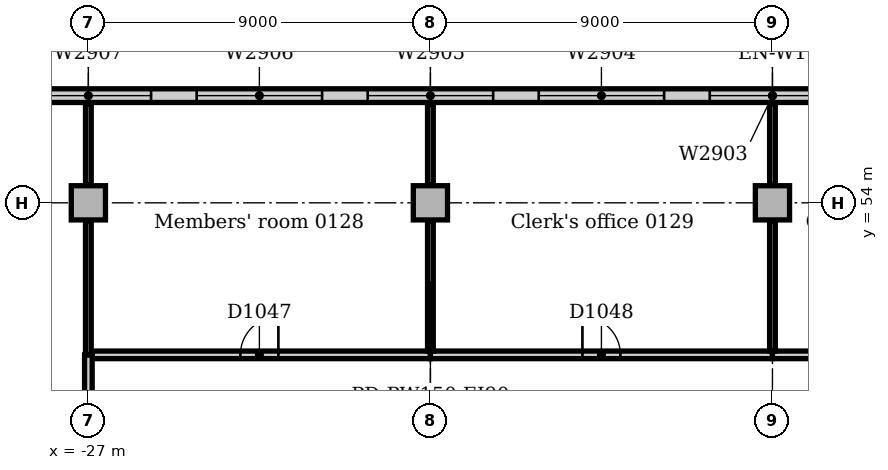
"""IFC4 building model, lengths in metres.
Left out: names, types, materials, properties, quantities, classifications, styles, units other than length and angle.
Written with IfcOpenShell. Run it as: python <this file> out.ifc"""

import sys

from ifc_helpers import new_model, si_unit, direction, frame, frame_2d, origin, origin_2d, place, context, subcontext, project, spatial, rectangle, extrude, element, fill, save


model = new_model("IFC4")
c1 = context("Model", 3, precision=1e-05, world=origin(), true_north=direction((0.0, 1.0)))
c2 = subcontext(c1, "Body", "Model", "MODEL_VIEW")
j1 = project(units=[si_unit("LENGTHUNIT", "METRE"), si_unit("PLANEANGLEUNIT", "RADIAN")], contexts=[c1])
p1 = place(None, origin())
s1 = spatial("IfcSite", under=j1, at=p1, CompositionType="ELEMENT")
p2 = place(p1, origin())
s2 = spatial("IfcBuilding", under=s1, at=p2, CompositionType="ELEMENT")
p3 = place(p2, frame((0.0, 0.0, 6.0)))
s3 = spatial("IfcBuildingStorey", under=s2, at=p3, CompositionType="ELEMENT", Elevation=6.0)
for number, where, z_axis, x_axis in (
    (1, (-27.0, 54.0, 0.0), (0.0, 0.0, 1.0), (1.0, 0.0, 0.0)),
    (2, (-18.0, 54.0, 0.0), (0.0, 0.0, 1.0), (1.0, 0.0, 0.0)),
    (3, (-9.0, 54.0, 0.0), (0.0, 0.0, 1.0), (1.0, 0.0, 0.0)),
):
    element("IfcColumn", number, at=place(p3, frame(where, z_axis=z_axis, x_axis=x_axis)), inside=s3, PredefinedType="COLUMN", context=c2, shape_type="SweptSolid", body=[
        extrude(rectangle(XDim=0.9, YDim=0.9, at=origin_2d()), origin(), (0.0, 0.0, 1.0), 4.7),
    ])
p4 = place(p3, frame((63.0, 56.82, 0.0), z_axis=(0.0, 0.0, 1.0), x_axis=(-1.0, 0.0, 0.0)))
e4 = element("IfcWall", 4, at=p4, inside=s3, PredefinedType="STANDARD", context=c2, shape_type="SweptSolid", body=[
    extrude(rectangle(XDim=144.0, YDim=0.36, at=frame_2d((72.0, 0.0))), origin(), (0.0, 0.0, 1.0), 4.7),
])
p5 = place(p4, frame((2.85, 0.0, 0.9)))
e5 = element("IfcOpeningElement", 5, at=p5, cuts=e4, PredefinedType="OPENING", context=c2, shape_type="SweptSolid", body=[
    extrude(rectangle(XDim=3.3, YDim=2.4, at=frame_2d((1.65, 1.2))), frame((0.0, 0.19, 0.0), z_axis=(0.0, -1.0, 0.0), x_axis=(1.0, 0.0, 0.0)), (0.0, 0.0, 1.0), 0.38),
])
p6 = place(p4, frame((7.35, 0.0, 0.9)))
e6 = element("IfcOpeningElement", 6, at=p6, cuts=e4, PredefinedType="OPENING", context=c2, shape_type="SweptSolid", body=[
    extrude(rectangle(XDim=3.3, YDim=2.4, at=frame_2d((1.65, 1.2))), frame((0.0, 0.19, 0.0), z_axis=(0.0, -1.0, 0.0), x_axis=(1.0, 0.0, 0.0)), (0.0, 0.0, 1.0), 0.38),
])
p7 = place(p4, frame((11.85, 0.0, 0.9)))
e7 = element("IfcOpeningElement", 7, at=p7, cuts=e4, PredefinedType="OPENING", context=c2, shape_type="SweptSolid", body=[
    extrude(rectangle(XDim=3.3, YDim=2.4, at=frame_2d((1.65, 1.2))), frame((0.0, 0.19, 0.0), z_axis=(0.0, -1.0, 0.0), x_axis=(1.0, 0.0, 0.0)), (0.0, 0.0, 1.0), 0.38),
])
p8 = place(p4, frame((16.35, 0.0, 0.9)))
e8 = element("IfcOpeningElement", 8, at=p8, cuts=e4, PredefinedType="OPENING", context=c2, shape_type="SweptSolid", body=[
    extrude(rectangle(XDim=3.3, YDim=2.4, at=frame_2d((1.65, 1.2))), frame((0.0, 0.19, 0.0), z_axis=(0.0, -1.0, 0.0), x_axis=(1.0, 0.0, 0.0)), (0.0, 0.0, 1.0), 0.38),
])
p9 = place(p4, frame((20.85, 0.0, 0.9)))
e9 = element("IfcOpeningElement", 9, at=p9, cuts=e4, PredefinedType="OPENING", context=c2, shape_type="SweptSolid", body=[
    extrude(rectangle(XDim=3.3, YDim=2.4, at=frame_2d((1.65, 1.2))), frame((0.0, 0.19, 0.0), z_axis=(0.0, -1.0, 0.0), x_axis=(1.0, 0.0, 0.0)), (0.0, 0.0, 1.0), 0.38),
])
p10 = place(p4, frame((25.35, 0.0, 0.9)))
e10 = element("IfcOpeningElement", 10, at=p10, cuts=e4, PredefinedType="OPENING", context=c2, shape_type="SweptSolid", body=[
    extrude(rectangle(XDim=3.3, YDim=2.4, at=frame_2d((1.65, 1.2))), frame((0.0, 0.19, 0.0), z_axis=(0.0, -1.0, 0.0), x_axis=(1.0, 0.0, 0.0)), (0.0, 0.0, 1.0), 0.38),
])
p11 = place(p4, frame((29.85, 0.0, 0.9)))
e11 = element("IfcOpeningElement", 11, at=p11, cuts=e4, PredefinedType="OPENING", context=c2, shape_type="SweptSolid", body=[
    extrude(rectangle(XDim=3.3, YDim=2.4, at=frame_2d((1.65, 1.2))), frame((0.0, 0.19, 0.0), z_axis=(0.0, -1.0, 0.0), x_axis=(1.0, 0.0, 0.0)), (0.0, 0.0, 1.0), 0.38),
])
p12 = place(p4, frame((34.35, 0.0, 0.9)))
e12 = element("IfcOpeningElement", 12, at=p12, cuts=e4, PredefinedType="OPENING", context=c2, shape_type="SweptSolid", body=[
    extrude(rectangle(XDim=3.3, YDim=2.4, at=frame_2d((1.65, 1.2))), frame((0.0, 0.19, 0.0), z_axis=(0.0, -1.0, 0.0), x_axis=(1.0, 0.0, 0.0)), (0.0, 0.0, 1.0), 0.38),
])
p13 = place(p4, frame((38.85, 0.0, 0.9)))
e13 = element("IfcOpeningElement", 13, at=p13, cuts=e4, PredefinedType="OPENING", context=c2, shape_type="SweptSolid", body=[
    extrude(rectangle(XDim=3.3, YDim=2.4, at=frame_2d((1.65, 1.2))), frame((0.0, 0.19, 0.0), z_axis=(0.0, -1.0, 0.0), x_axis=(1.0, 0.0, 0.0)), (0.0, 0.0, 1.0), 0.38),
])
p14 = place(p4, frame((43.35, 0.0, 0.9)))
e14 = element("IfcOpeningElement", 14, at=p14, cuts=e4, PredefinedType="OPENING", context=c2, shape_type="SweptSolid", body=[
    extrude(rectangle(XDim=3.3, YDim=2.4, at=frame_2d((1.65, 1.2))), frame((0.0, 0.19, 0.0), z_axis=(0.0, -1.0, 0.0), x_axis=(1.0, 0.0, 0.0)), (0.0, 0.0, 1.0), 0.38),
])
p15 = place(p4, frame((47.85, 0.0, 0.9)))
e15 = element("IfcOpeningElement", 15, at=p15, cuts=e4, PredefinedType="OPENING", context=c2, shape_type="SweptSolid", body=[
    extrude(rectangle(XDim=3.3, YDim=2.4, at=frame_2d((1.65, 1.2))), frame((0.0, 0.19, 0.0), z_axis=(0.0, -1.0, 0.0), x_axis=(1.0, 0.0, 0.0)), (0.0, 0.0, 1.0), 0.38),
])
p16 = place(p4, frame((52.35, 0.0, 0.9)))
e16 = element("IfcOpeningElement", 16, at=p16, cuts=e4, PredefinedType="OPENING", context=c2, shape_type="SweptSolid", body=[
    extrude(rectangle(XDim=3.3, YDim=2.4, at=frame_2d((1.65, 1.2))), frame((0.0, 0.19, 0.0), z_axis=(0.0, -1.0, 0.0), x_axis=(1.0, 0.0, 0.0)), (0.0, 0.0, 1.0), 0.38),
])
p17 = place(p4, frame((56.85, 0.0, 0.9)))
e17 = element("IfcOpeningElement", 17, at=p17, cuts=e4, PredefinedType="OPENING", context=c2, shape_type="SweptSolid", body=[
    extrude(rectangle(XDim=3.3, YDim=2.4, at=frame_2d((1.65, 1.2))), frame((0.0, 0.19, 0.0), z_axis=(0.0, -1.0, 0.0), x_axis=(1.0, 0.0, 0.0)), (0.0, 0.0, 1.0), 0.38),
])
p18 = place(p4, frame((61.35, 0.0, 0.9)))
e18 = element("IfcOpeningElement", 18, at=p18, cuts=e4, PredefinedType="OPENING", context=c2, shape_type="SweptSolid", body=[
    extrude(rectangle(XDim=3.3, YDim=2.4, at=frame_2d((1.65, 1.2))), frame((0.0, 0.19, 0.0), z_axis=(0.0, -1.0, 0.0), x_axis=(1.0, 0.0, 0.0)), (0.0, 0.0, 1.0), 0.38),
])
p19 = place(p4, frame((65.85, 0.0, 0.9)))
e19 = element("IfcOpeningElement", 19, at=p19, cuts=e4, PredefinedType="OPENING", context=c2, shape_type="SweptSolid", body=[
    extrude(rectangle(XDim=3.3, YDim=2.4, at=frame_2d((1.65, 1.2))), frame((0.0, 0.19, 0.0), z_axis=(0.0, -1.0, 0.0), x_axis=(1.0, 0.0, 0.0)), (0.0, 0.0, 1.0), 0.38),
])
p20 = place(p4, frame((70.35, 0.0, 0.9)))
e20 = element("IfcOpeningElement", 20, at=p20, cuts=e4, PredefinedType="OPENING", context=c2, shape_type="SweptSolid", body=[
    extrude(rectangle(XDim=3.3, YDim=2.4, at=frame_2d((1.65, 1.2))), frame((0.0, 0.19, 0.0), z_axis=(0.0, -1.0, 0.0), x_axis=(1.0, 0.0, 0.0)), (0.0, 0.0, 1.0), 0.38),
])
p21 = place(p4, frame((74.85, 0.0, 0.9)))
e21 = element("IfcOpeningElement", 21, at=p21, cuts=e4, PredefinedType="OPENING", context=c2, shape_type="SweptSolid", body=[
    extrude(rectangle(XDim=3.3, YDim=2.4, at=frame_2d((1.65, 1.2))), frame((0.0, 0.19, 0.0), z_axis=(0.0, -1.0, 0.0), x_axis=(1.0, 0.0, 0.0)), (0.0, 0.0, 1.0), 0.38),
])
p22 = place(p4, frame((79.35, 0.0, 0.9)))
e22 = element("IfcOpeningElement", 22, at=p22, cuts=e4, PredefinedType="OPENING", context=c2, shape_type="SweptSolid", body=[
    extrude(rectangle(XDim=3.3, YDim=2.4, at=frame_2d((1.65, 1.2))), frame((0.0, 0.19, 0.0), z_axis=(0.0, -1.0, 0.0), x_axis=(1.0, 0.0, 0.0)), (0.0, 0.0, 1.0), 0.38),
])
p23 = place(p4, frame((83.85, 0.0, 0.9)))
e23 = element("IfcOpeningElement", 23, at=p23, cuts=e4, PredefinedType="OPENING", context=c2, shape_type="SweptSolid", body=[
    extrude(rectangle(XDim=3.3, YDim=2.4, at=frame_2d((1.65, 1.2))), frame((0.0, 0.19, 0.0), z_axis=(0.0, -1.0, 0.0), x_axis=(1.0, 0.0, 0.0)), (0.0, 0.0, 1.0), 0.38),
])
p24 = place(p4, frame((88.35, 0.0, 0.9)))
e24 = element("IfcOpeningElement", 24, at=p24, cuts=e4, PredefinedType="OPENING", context=c2, shape_type="SweptSolid", body=[
    extrude(rectangle(XDim=3.3, YDim=2.4, at=frame_2d((1.65, 1.2))), frame((0.0, 0.19, 0.0), z_axis=(0.0, -1.0, 0.0), x_axis=(1.0, 0.0, 0.0)), (0.0, 0.0, 1.0), 0.38),
])
p25 = place(p4, frame((92.85, 0.0, 0.9)))
e25 = element("IfcOpeningElement", 25, at=p25, cuts=e4, PredefinedType="OPENING", context=c2, shape_type="SweptSolid", body=[
    extrude(rectangle(XDim=3.3, YDim=2.4, at=frame_2d((1.65, 1.2))), frame((0.0, 0.19, 0.0), z_axis=(0.0, -1.0, 0.0), x_axis=(1.0, 0.0, 0.0)), (0.0, 0.0, 1.0), 0.38),
])
p26 = place(p4, frame((97.35, 0.0, 0.9)))
e26 = element("IfcOpeningElement", 26, at=p26, cuts=e4, PredefinedType="OPENING", context=c2, shape_type="SweptSolid", body=[
    extrude(rectangle(XDim=3.3, YDim=2.4, at=frame_2d((1.65, 1.2))), frame((0.0, 0.19, 0.0), z_axis=(0.0, -1.0, 0.0), x_axis=(1.0, 0.0, 0.0)), (0.0, 0.0, 1.0), 0.38),
])
p27 = place(p4, frame((101.85, 0.0, 0.9)))
e27 = element("IfcOpeningElement", 27, at=p27, cuts=e4, PredefinedType="OPENING", context=c2, shape_type="SweptSolid", body=[
    extrude(rectangle(XDim=3.3, YDim=2.4, at=frame_2d((1.65, 1.2))), frame((0.0, 0.19, 0.0), z_axis=(0.0, -1.0, 0.0), x_axis=(1.0, 0.0, 0.0)), (0.0, 0.0, 1.0), 0.38),
])
p28 = place(p4, frame((106.35, 0.0, 0.9)))
e28 = element("IfcOpeningElement", 28, at=p28, cuts=e4, PredefinedType="OPENING", context=c2, shape_type="SweptSolid", body=[
    extrude(rectangle(XDim=3.3, YDim=2.4, at=frame_2d((1.65, 1.2))), frame((0.0, 0.19, 0.0), z_axis=(0.0, -1.0, 0.0), x_axis=(1.0, 0.0, 0.0)), (0.0, 0.0, 1.0), 0.38),
])
p29 = place(p4, frame((110.85, 0.0, 0.9)))
e29 = element("IfcOpeningElement", 29, at=p29, cuts=e4, PredefinedType="OPENING", context=c2, shape_type="SweptSolid", body=[
    extrude(rectangle(XDim=3.3, YDim=2.4, at=frame_2d((1.65, 1.2))), frame((0.0, 0.19, 0.0), z_axis=(0.0, -1.0, 0.0), x_axis=(1.0, 0.0, 0.0)), (0.0, 0.0, 1.0), 0.38),
])
p30 = place(p4, frame((115.35, 0.0, 0.9)))
e30 = element("IfcOpeningElement", 30, at=p30, cuts=e4, PredefinedType="OPENING", context=c2, shape_type="SweptSolid", body=[
    extrude(rectangle(XDim=3.3, YDim=2.4, at=frame_2d((1.65, 1.2))), frame((0.0, 0.19, 0.0), z_axis=(0.0, -1.0, 0.0), x_axis=(1.0, 0.0, 0.0)), (0.0, 0.0, 1.0), 0.38),
])
p31 = place(p4, frame((119.85, 0.0, 0.9)))
e31 = element("IfcOpeningElement", 31, at=p31, cuts=e4, PredefinedType="OPENING", context=c2, shape_type="SweptSolid", body=[
    extrude(rectangle(XDim=3.3, YDim=2.4, at=frame_2d((1.65, 1.2))), frame((0.0, 0.19, 0.0), z_axis=(0.0, -1.0, 0.0), x_axis=(1.0, 0.0, 0.0)), (0.0, 0.0, 1.0), 0.38),
])
p32 = place(p4, frame((124.35, 0.0, 0.9)))
e32 = element("IfcOpeningElement", 32, at=p32, cuts=e4, PredefinedType="OPENING", context=c2, shape_type="SweptSolid", body=[
    extrude(rectangle(XDim=3.3, YDim=2.4, at=frame_2d((1.65, 1.2))), frame((0.0, 0.19, 0.0), z_axis=(0.0, -1.0, 0.0), x_axis=(1.0, 0.0, 0.0)), (0.0, 0.0, 1.0), 0.38),
])
p33 = place(p4, frame((128.85, 0.0, 0.9)))
e33 = element("IfcOpeningElement", 33, at=p33, cuts=e4, PredefinedType="OPENING", context=c2, shape_type="SweptSolid", body=[
    extrude(rectangle(XDim=3.3, YDim=2.4, at=frame_2d((1.65, 1.2))), frame((0.0, 0.19, 0.0), z_axis=(0.0, -1.0, 0.0), x_axis=(1.0, 0.0, 0.0)), (0.0, 0.0, 1.0), 0.38),
])
p34 = place(p4, frame((133.35, 0.0, 0.9)))
e34 = element("IfcOpeningElement", 34, at=p34, cuts=e4, PredefinedType="OPENING", context=c2, shape_type="SweptSolid", body=[
    extrude(rectangle(XDim=3.3, YDim=2.4, at=frame_2d((1.65, 1.2))), frame((0.0, 0.19, 0.0), z_axis=(0.0, -1.0, 0.0), x_axis=(1.0, 0.0, 0.0)), (0.0, 0.0, 1.0), 0.38),
])
p35 = place(p4, frame((137.85, 0.0, 0.9)))
e35 = element("IfcOpeningElement", 35, at=p35, cuts=e4, PredefinedType="OPENING", context=c2, shape_type="SweptSolid", body=[
    extrude(rectangle(XDim=3.3, YDim=2.4, at=frame_2d((1.65, 1.2))), frame((0.0, 0.19, 0.0), z_axis=(0.0, -1.0, 0.0), x_axis=(1.0, 0.0, 0.0)), (0.0, 0.0, 1.0), 0.38),
])
p36 = place(p3, frame((-26.9, 50.0, 0.0), z_axis=(0.0, 0.0, 1.0), x_axis=(1.0, 0.0, 0.0)))
e36 = element("IfcWall", 36, at=p36, inside=s3, PredefinedType="PARTITIONING", context=c2, shape_type="SweptSolid", body=[
    extrude(rectangle(XDim=8.9, YDim=0.2, at=frame_2d((4.45, 0.0))), origin(), (0.0, 0.0, 1.0), 4.7),
])
p37 = place(p36, frame((3.9, 0.0, 0.0)))
e37 = element("IfcOpeningElement", 37, at=p37, cuts=e36, PredefinedType="OPENING", context=c2, shape_type="SweptSolid", body=[
    extrude(rectangle(XDim=1.0, YDim=2.1, at=frame_2d((0.5, 1.05))), frame((0.0, 0.11, 0.0), z_axis=(0.0, -1.0, 0.0), x_axis=(1.0, 0.0, 0.0)), (0.0, 0.0, 1.0), 0.22),
])
p38 = place(p3, frame((-18.0, 50.0, 0.0), z_axis=(0.0, 0.0, 1.0), x_axis=(1.0, 0.0, 0.0)))
e38 = element("IfcWall", 38, at=p38, inside=s3, PredefinedType="PARTITIONING", context=c2, shape_type="SweptSolid", body=[
    extrude(rectangle(XDim=9.0, YDim=0.2, at=frame_2d((4.5, 0.0))), origin(), (0.0, 0.0, 1.0), 4.7),
])
p39 = place(p38, frame((4.0, 0.0, 0.0)))
e39 = element("IfcOpeningElement", 39, at=p39, cuts=e38, PredefinedType="OPENING", context=c2, shape_type="SweptSolid", body=[
    extrude(rectangle(XDim=1.0, YDim=2.1, at=frame_2d((0.5, 1.05))), frame((0.0, 0.11, 0.0), z_axis=(0.0, -1.0, 0.0), x_axis=(1.0, 0.0, 0.0)), (0.0, 0.0, 1.0), 0.22),
])
p40 = place(p3, frame((-9.0, 50.0, 0.0), z_axis=(0.0, 0.0, 1.0), x_axis=(1.0, 0.0, 0.0)))
e40 = element("IfcWall", 40, at=p40, inside=s3, PredefinedType="PARTITIONING", context=c2, shape_type="SweptSolid", body=[
    extrude(rectangle(XDim=8.9, YDim=0.2, at=frame_2d((4.45, 0.0))), origin(), (0.0, 0.0, 1.0), 4.7),
])
p41 = place(p40, frame((4.0, 0.0, 0.0)))
e41 = element("IfcOpeningElement", 41, at=p41, cuts=e40, PredefinedType="OPENING", context=c2, shape_type="SweptSolid", body=[
    extrude(rectangle(XDim=1.0, YDim=2.1, at=frame_2d((0.5, 1.05))), frame((0.0, 0.11, 0.0), z_axis=(0.0, -1.0, 0.0), x_axis=(1.0, 0.0, 0.0)), (0.0, 0.0, 1.0), 0.22),
])
p42 = place(p3, frame((-27.0, 46.0, 0.0), z_axis=(0.0, 0.0, 1.0), x_axis=(0.0, 1.0, 0.0)))
e42 = element("IfcWall", 42, at=p42, inside=s3, PredefinedType="PARTITIONING", context=c2, shape_type="SweptSolid", body=[
    extrude(rectangle(XDim=4.0, YDim=0.2, at=frame_2d((2.0, 0.0))), origin(), (0.0, 0.0, 1.0), 4.7),
])
p43 = place(p3, frame((-18.0, 50.1, 0.0), z_axis=(0.0, 0.0, 1.0), x_axis=(0.0, 1.0, 0.0)))
e43 = element("IfcWall", 43, at=p43, inside=s3, PredefinedType="PARTITIONING", context=c2, shape_type="SweptSolid", body=[
    extrude(rectangle(XDim=3.43, YDim=0.15, at=frame_2d((1.715, 0.0))), origin(), (0.0, 0.0, 1.0), 4.7),
])
p44 = place(p3, frame((-18.0, 54.47, 0.0), z_axis=(0.0, 0.0, 1.0), x_axis=(0.0, 1.0, 0.0)))
e44 = element("IfcWall", 44, at=p44, inside=s3, PredefinedType="PARTITIONING", context=c2, shape_type="SweptSolid", body=[
    extrude(rectangle(XDim=2.13, YDim=0.15, at=frame_2d((1.065, 0.0))), origin(), (0.0, 0.0, 1.0), 4.7),
])
p45 = place(p3, frame((-27.0, 50.0, 0.0), z_axis=(0.0, 0.0, 1.0), x_axis=(0.0, 1.0, 0.0)))
e45 = element("IfcWall", 45, at=p45, inside=s3, PredefinedType="PARTITIONING", context=c2, shape_type="SweptSolid", body=[
    extrude(rectangle(XDim=3.53, YDim=0.15, at=frame_2d((1.765, 0.0))), origin(), (0.0, 0.0, 1.0), 4.7),
])
p46 = place(p3, frame((-27.0, 54.47, 0.0), z_axis=(0.0, 0.0, 1.0), x_axis=(0.0, 1.0, 0.0)))
e46 = element("IfcWall", 46, at=p46, inside=s3, PredefinedType="PARTITIONING", context=c2, shape_type="SweptSolid", body=[
    extrude(rectangle(XDim=2.13, YDim=0.15, at=frame_2d((1.065, 0.0))), origin(), (0.0, 0.0, 1.0), 4.7),
])
p47 = place(p3, frame((-9.0, 50.1, 0.0), z_axis=(0.0, 0.0, 1.0), x_axis=(0.0, 1.0, 0.0)))
e47 = element("IfcWall", 47, at=p47, inside=s3, PredefinedType="PARTITIONING", context=c2, shape_type="SweptSolid", body=[
    extrude(rectangle(XDim=3.43, YDim=0.15, at=frame_2d((1.715, 0.0))), origin(), (0.0, 0.0, 1.0), 4.7),
])
p48 = place(p3, frame((-9.0, 54.47, 0.0), z_axis=(0.0, 0.0, 1.0), x_axis=(0.0, 1.0, 0.0)))
e48 = element("IfcWall", 48, at=p48, inside=s3, PredefinedType="PARTITIONING", context=c2, shape_type="SweptSolid", body=[
    extrude(rectangle(XDim=2.13, YDim=0.15, at=frame_2d((1.065, 0.0))), origin(), (0.0, 0.0, 1.0), 4.7),
])
p49 = place(p20, origin())
e49 = element("IfcWindow", 49, at=p49, inside=s3, PartitioningType="SINGLE_PANEL", PredefinedType="WINDOW", context=c2, shape_type="SweptSolid", body=[
    extrude(rectangle(XDim=3.3, YDim=2.4, at=frame_2d((1.65, 1.2))), frame((0.0, 0.13, 0.0), z_axis=(0.0, -1.0, 0.0), x_axis=(1.0, 0.0, 0.0)), (0.0, 0.0, 1.0), 0.06),
])
fill(e20, e49)
p50 = place(p21, origin())
e50 = element("IfcWindow", 50, at=p50, inside=s3, PartitioningType="SINGLE_PANEL", PredefinedType="WINDOW", context=c2, shape_type="SweptSolid", body=[
    extrude(rectangle(XDim=3.3, YDim=2.4, at=frame_2d((1.65, 1.2))), frame((0.0, 0.13, 0.0), z_axis=(0.0, -1.0, 0.0), x_axis=(1.0, 0.0, 0.0)), (0.0, 0.0, 1.0), 0.06),
])
fill(e21, e50)
p51 = place(p22, origin())
e51 = element("IfcWindow", 51, at=p51, inside=s3, PartitioningType="SINGLE_PANEL", PredefinedType="WINDOW", context=c2, shape_type="SweptSolid", body=[
    extrude(rectangle(XDim=3.3, YDim=2.4, at=frame_2d((1.65, 1.2))), frame((0.0, 0.13, 0.0), z_axis=(0.0, -1.0, 0.0), x_axis=(1.0, 0.0, 0.0)), (0.0, 0.0, 1.0), 0.06),
])
fill(e22, e51)
p52 = place(p23, origin())
e52 = element("IfcWindow", 52, at=p52, inside=s3, PartitioningType="SINGLE_PANEL", PredefinedType="WINDOW", context=c2, shape_type="SweptSolid", body=[
    extrude(rectangle(XDim=3.3, YDim=2.4, at=frame_2d((1.65, 1.2))), frame((0.0, 0.13, 0.0), z_axis=(0.0, -1.0, 0.0), x_axis=(1.0, 0.0, 0.0)), (0.0, 0.0, 1.0), 0.06),
])
fill(e23, e52)
p53 = place(p24, origin())
e53 = element("IfcWindow", 53, at=p53, inside=s3, PartitioningType="SINGLE_PANEL", PredefinedType="WINDOW", context=c2, shape_type="SweptSolid", body=[
    extrude(rectangle(XDim=3.3, YDim=2.4, at=frame_2d((1.65, 1.2))), frame((0.0, 0.13, 0.0), z_axis=(0.0, -1.0, 0.0), x_axis=(1.0, 0.0, 0.0)), (0.0, 0.0, 1.0), 0.06),
])
fill(e24, e53)
p54 = place(p37, origin())
e54 = element("IfcDoor", 54, at=p54, inside=s3, OperationType="SINGLE_SWING_RIGHT", PredefinedType="DOOR", context=c2, shape_type="SweptSolid", body=[
    extrude(rectangle(XDim=1.0, YDim=2.1, at=frame_2d((0.5, 1.05))), frame((0.0, 0.025, 0.0), z_axis=(0.0, -1.0, 0.0), x_axis=(1.0, 0.0, 0.0)), (0.0, 0.0, 1.0), 0.05),
])
fill(e37, e54)
p55 = place(p39, origin())
e55 = element("IfcDoor", 55, at=p55, inside=s3, OperationType="SINGLE_SWING_LEFT", PredefinedType="DOOR", context=c2, shape_type="SweptSolid", body=[
    extrude(rectangle(XDim=1.0, YDim=2.1, at=frame_2d((0.5, 1.05))), frame((0.0, 0.025, 0.0), z_axis=(0.0, -1.0, 0.0), x_axis=(1.0, 0.0, 0.0)), (0.0, 0.0, 1.0), 0.05),
])
fill(e39, e55)
save(model, sys.argv[1])
